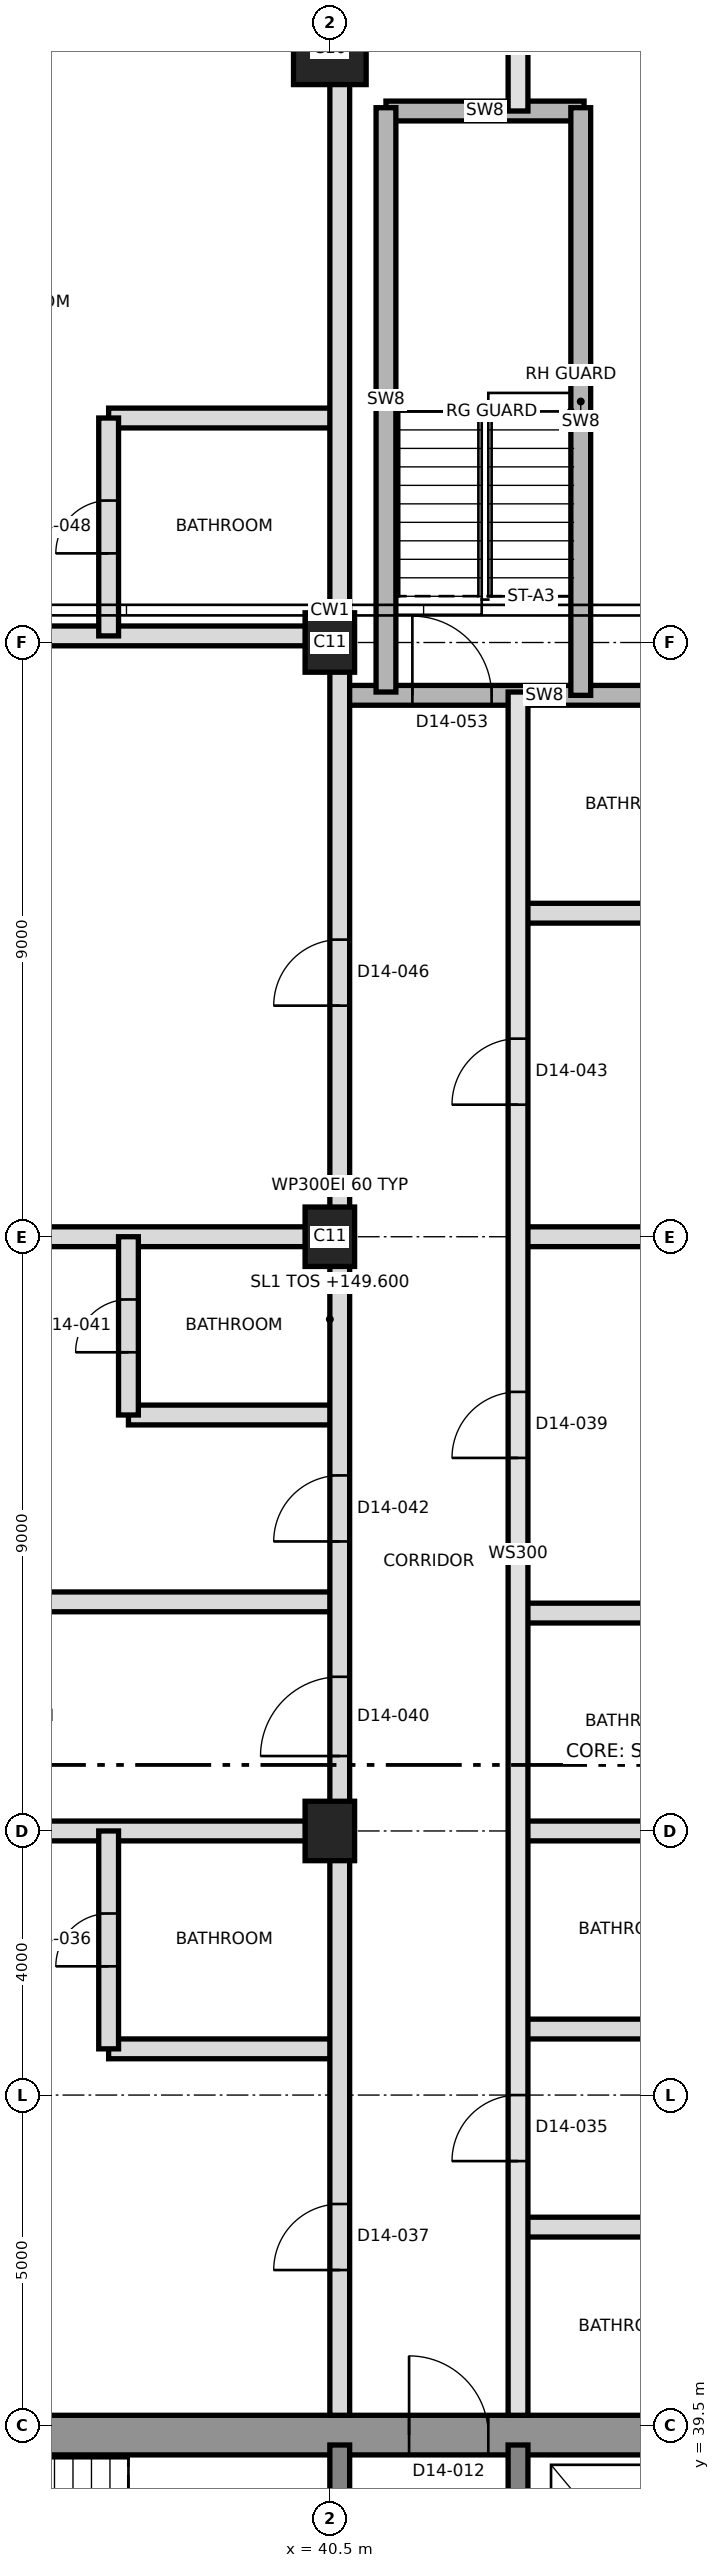
"""IFC4 building model, lengths in metres.
Left out: names, types, materials, properties, quantities, classifications, styles, units other than length and angle.
Written with IfcOpenShell. Run it as: python <this file> out.ifc"""

import sys

from ifc_helpers import new_model, si_unit, direction, frame, frame_2d, origin, origin_2d, place, context, subcontext, project, spatial, rectangle, extrude, element, fill, save


model = new_model("IFC4")
c1 = context("Model", 3, precision=1e-05, world=origin(), true_north=direction((0.0, 1.0)))
c2 = subcontext(c1, "Body", "Model", "MODEL_VIEW")
j1 = project(units=[si_unit("LENGTHUNIT", "METRE"), si_unit("PLANEANGLEUNIT", "RADIAN")], contexts=[c1])
p1 = place(None, origin())
s1 = spatial("IfcSite", under=j1, at=p1, CompositionType="ELEMENT")
p2 = place(p1, origin())
s2 = spatial("IfcBuilding", under=s1, at=p2, CompositionType="ELEMENT")
p3 = place(p2, frame((0.0, 0.0, 149.6)))
s3 = spatial("IfcBuildingStorey", under=s2, at=p3, CompositionType="ELEMENT", Elevation=149.6)
p4 = place(p3, frame((31.2, 39.35, 0.0), z_axis=(0.0, 0.0, 1.0), x_axis=(1.0, 0.0, 0.0)))
e1 = element("IfcWall", 1, at=p4, inside=s3, PredefinedType="SHEAR", context=c2, shape_type="SweptSolid", body=[
    extrude(rectangle(XDim=27.0, YDim=0.6, at=frame_2d((13.5, 0.0))), origin(), (0.0, 0.0, 1.0), 3.7),
])
p5 = place(p4, frame((10.5, 0.0, 0.0)))
e2 = element("IfcOpeningElement", 2, at=p5, cuts=e1, PredefinedType="OPENING", context=c2, shape_type="SweptSolid", body=[
    extrude(rectangle(XDim=1.2, YDim=2.1, at=frame_2d((0.6, 1.05))), frame((0.0, 0.31, 0.0), z_axis=(0.0, -1.0, 0.0), x_axis=(1.0, 0.0, 0.0)), (0.0, 0.0, 1.0), 0.62),
])
for number, where, z_axis, x_axis in (
    (3, (40.65, 33.5, 0.0), (0.0, 0.0, 1.0), (0.0, 1.0, 0.0)),
    (4, (43.35, 33.5, 0.0), (0.0, 0.0, 1.0), (0.0, 1.0, 0.0)),
):
    element("IfcWall", number, at=place(p3, frame(where, z_axis=z_axis, x_axis=x_axis)), inside=s3, PredefinedType="SHEAR", context=c2, shape_type="SweptSolid", body=[
        extrude(rectangle(XDim=5.7, YDim=0.3, at=frame_2d((2.85, 0.0))), origin(), (0.0, 0.0, 1.0), 3.7),
    ])
for number, where, z_axis, x_axis in (
    (5, (40.5, 48.5, 0.0), (0.0, 0.0, 1.0), (0.0, 1.0, 0.0)),
    (6, (40.5, 57.5, 0.0), (0.0, 0.0, 1.0), (0.0, 1.0, 0.0)),
    (7, (40.5, 66.5, 0.0), (0.0, 0.0, 1.0), (0.0, 1.0, 0.0)),
):
    element("IfcColumn", number, at=place(p3, frame(where, z_axis=z_axis, x_axis=x_axis)), inside=s3, PredefinedType="COLUMN", context=c2, shape_type="SweptSolid", body=[
        extrude(rectangle(XDim=0.9, YDim=0.75, at=origin_2d()), origin(), (0.0, 0.0, 1.0), 3.7),
    ])
p6 = place(p3, frame((40.5, 75.5, 0.0), z_axis=(0.0, 0.0, 1.0), x_axis=(1.0, 0.0, 0.0)))
e8 = element("IfcColumn", 8, at=p6, inside=s3, PredefinedType="COLUMN", context=c2, shape_type="SweptSolid", body=[
    extrude(rectangle(XDim=1.1, YDim=1.1, at=origin_2d()), origin(), (0.0, 0.0, 1.0), 3.7),
])
p7 = place(p3, frame((43.35, 42.5, 0.0), z_axis=(0.0, 0.0, 1.0), x_axis=(1.0, 0.0, 0.0)))
e9 = element("IfcWall", 9, at=p7, inside=s3, PredefinedType="PARTITIONING", context=c2, shape_type="SweptSolid", body=[
    extrude(rectangle(XDim=3.3, YDim=0.3, at=frame_2d((1.65, 0.0))), origin(), (0.0, 0.0, 1.0), 3.4),
])
p8 = place(p3, frame((37.15, 45.2, 0.0), z_axis=(0.0, 0.0, 1.0), x_axis=(1.0, 0.0, 0.0)))
e10 = element("IfcWall", 10, at=p8, inside=s3, PredefinedType="PARTITIONING", context=c2, shape_type="SweptSolid", body=[
    extrude(rectangle(XDim=3.5, YDim=0.3, at=frame_2d((1.75, 0.0))), origin(), (0.0, 0.0, 1.0), 3.4),
])
p9 = place(p3, frame((43.35, 45.5, 0.0), z_axis=(0.0, 0.0, 1.0), x_axis=(1.0, 0.0, 0.0)))
e11 = element("IfcWall", 11, at=p9, inside=s3, PredefinedType="PARTITIONING", context=c2, shape_type="SweptSolid", body=[
    extrude(rectangle(XDim=3.3, YDim=0.3, at=frame_2d((1.65, 0.0))), origin(), (0.0, 0.0, 1.0), 3.4),
])
p10 = place(p3, frame((30.35, 48.5, 0.0), z_axis=(0.0, 0.0, 1.0), x_axis=(1.0, 0.0, 0.0)))
e12 = element("IfcWall", 12, at=p10, inside=s3, PredefinedType="PARTITIONING", context=c2, shape_type="SweptSolid", body=[
    extrude(rectangle(XDim=10.3, YDim=0.3, at=frame_2d((5.15, 0.0))), origin(), (0.0, 0.0, 1.0), 3.35),
])
p11 = place(p3, frame((43.35, 48.5, 0.0), z_axis=(0.0, 0.0, 1.0), x_axis=(1.0, 0.0, 0.0)))
e13 = element("IfcWall", 13, at=p11, inside=s3, PredefinedType="PARTITIONING", context=c2, shape_type="SweptSolid", body=[
    extrude(rectangle(XDim=7.48, YDim=0.3, at=frame_2d((3.74, 0.0))), origin(), (0.0, 0.0, 1.0), 3.35),
])
p12 = place(p3, frame((43.35, 51.8, 0.0), z_axis=(0.0, 0.0, 1.0), x_axis=(1.0, 0.0, 0.0)))
e14 = element("IfcWall", 14, at=p12, inside=s3, PredefinedType="PARTITIONING", context=c2, shape_type="SweptSolid", body=[
    extrude(rectangle(XDim=3.5, YDim=0.3, at=frame_2d((1.75, 0.0))), origin(), (0.0, 0.0, 1.0), 3.4),
])
p13 = place(p3, frame((30.35, 51.97, 0.0), z_axis=(0.0, 0.0, 1.0), x_axis=(1.0, 0.0, 0.0)))
e15 = element("IfcWall", 15, at=p13, inside=s3, PredefinedType="PARTITIONING", context=c2, shape_type="SweptSolid", body=[
    extrude(rectangle(XDim=10.3, YDim=0.3, at=frame_2d((5.15, 0.0))), origin(), (0.0, 0.0, 1.0), 3.35),
])
p14 = place(p3, frame((37.45, 54.8, 0.0), z_axis=(0.0, 0.0, 1.0), x_axis=(1.0, 0.0, 0.0)))
e16 = element("IfcWall", 16, at=p14, inside=s3, PredefinedType="PARTITIONING", context=c2, shape_type="SweptSolid", body=[
    extrude(rectangle(XDim=3.2, YDim=0.3, at=frame_2d((1.6, 0.0))), origin(), (0.0, 0.0, 1.0), 3.4),
])
p15 = place(p3, frame((30.35, 57.5, 0.0), z_axis=(0.0, 0.0, 1.0), x_axis=(1.0, 0.0, 0.0)))
e17 = element("IfcWall", 17, at=p15, inside=s3, PredefinedType="PARTITIONING", context=c2, shape_type="SweptSolid", body=[
    extrude(rectangle(XDim=10.3, YDim=0.3, at=frame_2d((5.15, 0.0))), origin(), (0.0, 0.0, 1.0), 3.35),
])
p16 = place(p3, frame((43.35, 57.5, 0.0), z_axis=(0.0, 0.0, 1.0), x_axis=(1.0, 0.0, 0.0)))
e18 = element("IfcWall", 18, at=p16, inside=s3, PredefinedType="PARTITIONING", context=c2, shape_type="SweptSolid", body=[
    extrude(rectangle(XDim=7.48, YDim=0.3, at=frame_2d((3.74, 0.0))), origin(), (0.0, 0.0, 1.0), 3.35),
])
p17 = place(p3, frame((43.35, 62.4, 0.0), z_axis=(0.0, 0.0, 1.0), x_axis=(1.0, 0.0, 0.0)))
e19 = element("IfcWall", 19, at=p17, inside=s3, PredefinedType="PARTITIONING", context=c2, shape_type="SweptSolid", body=[
    extrude(rectangle(XDim=7.48, YDim=0.3, at=frame_2d((3.74, 0.0))), origin(), (0.0, 0.0, 1.0), 3.35),
])
p18 = place(p17, frame((4.65, 0.0, 0.0)))
e20 = element("IfcOpeningElement", 20, at=p18, cuts=e19, PredefinedType="OPENING", context=c2, shape_type="SweptSolid", body=[
    extrude(rectangle(XDim=1.0, YDim=2.1, at=frame_2d((0.5, 1.05))), frame((0.0, 0.16, 0.0), z_axis=(0.0, -1.0, 0.0), x_axis=(1.0, 0.0, 0.0)), (0.0, 0.0, 1.0), 0.32),
])
p19 = place(p3, frame((40.65, 65.7, 0.0), z_axis=(0.0, 0.0, 1.0), x_axis=(1.0, 0.0, 0.0)))
e21 = element("IfcWall", 21, at=p19, inside=s3, PredefinedType="SHEAR", context=c2, shape_type="SweptSolid", body=[
    extrude(rectangle(XDim=6.2, YDim=0.3, at=frame_2d((3.1, 0.0))), origin(), (0.0, 0.0, 1.0), 3.4),
])
p20 = place(p19, frame((1.1, 0.0, 0.0)))
e22 = element("IfcOpeningElement", 22, at=p20, cuts=e21, PredefinedType="OPENING", context=c2, shape_type="SweptSolid", body=[
    extrude(rectangle(XDim=1.2, YDim=2.1, at=frame_2d((0.6, 1.05))), frame((0.0, 0.16, 0.0), z_axis=(0.0, -1.0, 0.0), x_axis=(1.0, 0.0, 0.0)), (0.0, 0.0, 1.0), 0.32),
])
p21 = place(p3, frame((30.35, 66.6, 0.0), z_axis=(0.0, 0.0, 1.0), x_axis=(1.0, 0.0, 0.0)))
e23 = element("IfcWall", 23, at=p21, inside=s3, PredefinedType="PARTITIONING", context=c2, shape_type="SweptSolid", body=[
    extrude(rectangle(XDim=10.3, YDim=0.3, at=frame_2d((5.15, 0.0))), origin(), (0.0, 0.0, 1.0), 3.35),
])
p22 = place(p21, frame((4.65, 0.0, 0.0)))
e24 = element("IfcOpeningElement", 24, at=p22, cuts=e23, PredefinedType="OPENING", context=c2, shape_type="SweptSolid", body=[
    extrude(rectangle(XDim=1.0, YDim=2.1, at=frame_2d((0.5, 1.05))), frame((0.0, 0.16, 0.0), z_axis=(0.0, -1.0, 0.0), x_axis=(1.0, 0.0, 0.0)), (0.0, 0.0, 1.0), 0.32),
])
p23 = place(p3, frame((37.15, 69.9, 0.0), z_axis=(0.0, 0.0, 1.0), x_axis=(1.0, 0.0, 0.0)))
e25 = element("IfcWall", 25, at=p23, inside=s3, PredefinedType="PARTITIONING", context=c2, shape_type="SweptSolid", body=[
    extrude(rectangle(XDim=3.5, YDim=0.3, at=frame_2d((1.75, 0.0))), origin(), (0.0, 0.0, 1.0), 3.4),
])
p24 = place(p3, frame((41.35, 74.55, 0.0), z_axis=(0.0, 0.0, 1.0), x_axis=(1.0, 0.0, 0.0)))
e26 = element("IfcWall", 26, at=p24, inside=s3, PredefinedType="SHEAR", context=c2, shape_type="SweptSolid", body=[
    extrude(rectangle(XDim=3.0, YDim=0.3, at=frame_2d((1.5, 0.0))), origin(), (0.0, 0.0, 1.0), 3.4),
])
p25 = place(p3, frame((37.15, 45.2, 0.0), z_axis=(0.0, 0.0, 1.0), x_axis=(0.0, 1.0, 0.0)))
e27 = element("IfcWall", 27, at=p25, inside=s3, PredefinedType="PARTITIONING", context=c2, shape_type="SweptSolid", body=[
    extrude(rectangle(XDim=3.3, YDim=0.3, at=frame_2d((1.65, 0.0))), origin(), (0.0, 0.0, 1.0), 3.4),
])
p26 = place(p25, frame((1.25, 0.0, 0.0)))
e28 = element("IfcOpeningElement", 28, at=p26, cuts=e27, PredefinedType="OPENING", context=c2, shape_type="SweptSolid", body=[
    extrude(rectangle(XDim=0.8, YDim=2.1, at=frame_2d((0.4, 1.05))), frame((0.0, 0.16, 0.0), z_axis=(0.0, -1.0, 0.0), x_axis=(1.0, 0.0, 0.0)), (0.0, 0.0, 1.0), 0.32),
])
p27 = place(p3, frame((37.15, 66.6, 0.0), z_axis=(0.0, 0.0, 1.0), x_axis=(0.0, 1.0, 0.0)))
e29 = element("IfcWall", 29, at=p27, inside=s3, PredefinedType="PARTITIONING", context=c2, shape_type="SweptSolid", body=[
    extrude(rectangle(XDim=3.3, YDim=0.3, at=frame_2d((1.65, 0.0))), origin(), (0.0, 0.0, 1.0), 3.4),
])
p28 = place(p27, frame((1.25, 0.0, 0.0)))
e30 = element("IfcOpeningElement", 30, at=p28, cuts=e29, PredefinedType="OPENING", context=c2, shape_type="SweptSolid", body=[
    extrude(rectangle(XDim=0.8, YDim=2.1, at=frame_2d((0.4, 1.05))), frame((0.0, 0.16, 0.0), z_axis=(0.0, -1.0, 0.0), x_axis=(1.0, 0.0, 0.0)), (0.0, 0.0, 1.0), 0.32),
])
p29 = place(p3, frame((37.45, 54.8, 0.0), z_axis=(0.0, 0.0, 1.0), x_axis=(0.0, 1.0, 0.0)))
e31 = element("IfcWall", 31, at=p29, inside=s3, PredefinedType="PARTITIONING", context=c2, shape_type="SweptSolid", body=[
    extrude(rectangle(XDim=2.7, YDim=0.3, at=frame_2d((1.35, 0.0))), origin(), (0.0, 0.0, 1.0), 3.4),
])
p30 = place(p29, frame((0.95, 0.0, 0.0)))
e32 = element("IfcOpeningElement", 32, at=p30, cuts=e31, PredefinedType="OPENING", context=c2, shape_type="SweptSolid", body=[
    extrude(rectangle(XDim=0.8, YDim=2.1, at=frame_2d((0.4, 1.05))), frame((0.0, 0.16, 0.0), z_axis=(0.0, -1.0, 0.0), x_axis=(1.0, 0.0, 0.0)), (0.0, 0.0, 1.0), 0.32),
])
p31 = place(p3, frame((40.65, 39.65, 0.0), z_axis=(0.0, 0.0, 1.0), x_axis=(0.0, 1.0, 0.0)))
e33 = element("IfcWall", 33, at=p31, inside=s3, PredefinedType="PARTITIONING", context=c2, shape_type="SweptSolid", body=[
    extrude(rectangle(XDim=37.24, YDim=0.3, at=frame_2d((18.62, 0.0))), origin(), (0.0, 0.0, 1.0), 3.35),
])
p32 = place(p31, frame((2.2, 0.0, 0.0)))
e34 = element("IfcOpeningElement", 34, at=p32, cuts=e33, PredefinedType="OPENING", context=c2, shape_type="SweptSolid", body=[
    extrude(rectangle(XDim=1.0, YDim=2.4, at=frame_2d((0.5, 1.2))), frame((0.0, 0.16, 0.0), z_axis=(0.0, -1.0, 0.0), x_axis=(1.0, 0.0, 0.0)), (0.0, 0.0, 1.0), 0.32),
])
p33 = place(p31, frame((9.985, 0.0, 0.0)))
e35 = element("IfcOpeningElement", 35, at=p33, cuts=e33, PredefinedType="OPENING", context=c2, shape_type="SweptSolid", body=[
    extrude(rectangle(XDim=1.2, YDim=2.1, at=frame_2d((0.6, 1.05))), frame((0.0, 0.16, 0.0), z_axis=(0.0, -1.0, 0.0), x_axis=(1.0, 0.0, 0.0)), (0.0, 0.0, 1.0), 0.32),
])
p34 = place(p31, frame((13.235, 0.0, 0.0)))
e36 = element("IfcOpeningElement", 36, at=p34, cuts=e33, PredefinedType="OPENING", context=c2, shape_type="SweptSolid", body=[
    extrude(rectangle(XDim=1.0, YDim=2.1, at=frame_2d((0.5, 1.05))), frame((0.0, 0.16, 0.0), z_axis=(0.0, -1.0, 0.0), x_axis=(1.0, 0.0, 0.0)), (0.0, 0.0, 1.0), 0.32),
])
p35 = place(p31, frame((21.35, 0.0, 0.0)))
e37 = element("IfcOpeningElement", 37, at=p35, cuts=e33, PredefinedType="OPENING", context=c2, shape_type="SweptSolid", body=[
    extrude(rectangle(XDim=1.0, YDim=2.4, at=frame_2d((0.5, 1.2))), frame((0.0, 0.16, 0.0), z_axis=(0.0, -1.0, 0.0), x_axis=(1.0, 0.0, 0.0)), (0.0, 0.0, 1.0), 0.32),
])
p36 = place(p3, frame((41.35, 65.75, 0.0), z_axis=(0.0, 0.0, 1.0), x_axis=(0.0, 1.0, 0.0)))
e38 = element("IfcWall", 38, at=p36, inside=s3, PredefinedType="SHEAR", context=c2, shape_type="SweptSolid", body=[
    extrude(rectangle(XDim=8.85, YDim=0.3, at=frame_2d((4.425, 0.0))), origin(), (0.0, 0.0, 1.0), 3.4),
])
p37 = place(p3, frame((43.35, 39.65, 0.0), z_axis=(0.0, 0.0, 1.0), x_axis=(0.0, 1.0, 0.0)))
e39 = element("IfcWall", 39, at=p37, inside=s3, PredefinedType="SOLIDWALL", context=c2, shape_type="SweptSolid", body=[
    extrude(rectangle(XDim=26.1, YDim=0.3, at=frame_2d((13.05, 0.0))), origin(), (0.0, 0.0, 1.0), 3.4),
])
p38 = place(p37, frame((3.85, 0.0, 0.0)))
e40 = element("IfcOpeningElement", 40, at=p38, cuts=e39, PredefinedType="OPENING", context=c2, shape_type="SweptSolid", body=[
    extrude(rectangle(XDim=1.0, YDim=2.4, at=frame_2d((0.5, 1.2))), frame((0.0, 0.16, 0.0), z_axis=(0.0, -1.0, 0.0), x_axis=(1.0, 0.0, 0.0)), (0.0, 0.0, 1.0), 0.32),
])
p39 = place(p37, frame((14.5, 0.0, 0.0)))
e41 = element("IfcOpeningElement", 41, at=p39, cuts=e39, PredefinedType="OPENING", context=c2, shape_type="SweptSolid", body=[
    extrude(rectangle(XDim=1.0, YDim=2.4, at=frame_2d((0.5, 1.2))), frame((0.0, 0.16, 0.0), z_axis=(0.0, -1.0, 0.0), x_axis=(1.0, 0.0, 0.0)), (0.0, 0.0, 1.0), 0.32),
])
p40 = place(p37, frame((19.85, 0.0, 0.0)))
e42 = element("IfcOpeningElement", 42, at=p40, cuts=e39, PredefinedType="OPENING", context=c2, shape_type="SweptSolid", body=[
    extrude(rectangle(XDim=1.0, YDim=2.4, at=frame_2d((0.5, 1.2))), frame((0.0, 0.16, 0.0), z_axis=(0.0, -1.0, 0.0), x_axis=(1.0, 0.0, 0.0)), (0.0, 0.0, 1.0), 0.32),
])
p41 = place(p3, frame((43.35, 74.55, 0.0), z_axis=(0.0, 0.0, 1.0), x_axis=(0.0, 1.0, 0.0)))
e43 = element("IfcWall", 43, at=p41, inside=s3, PredefinedType="SOLIDWALL", context=c2, shape_type="SweptSolid", body=[
    extrude(rectangle(XDim=2.022, YDim=0.3, at=frame_2d((1.011, 0.0))), origin(), (0.0, 0.0, 1.0), 3.35),
])
p42 = place(p3, frame((44.3, 65.7, 0.0), z_axis=(0.0, 0.0, 1.0), x_axis=(0.0, 1.0, 0.0)))
e44 = element("IfcWall", 44, at=p42, inside=s3, PredefinedType="SHEAR", context=c2, shape_type="SweptSolid", body=[
    extrude(rectangle(XDim=8.9, YDim=0.3, at=frame_2d((4.45, 0.0))), origin(), (0.0, 0.0, 1.0), 3.4),
])
p43 = place(p5, origin())
e45 = element("IfcDoor", 45, at=p43, inside=s3, OperationType="SINGLE_SWING_RIGHT", PredefinedType="DOOR", context=c2, shape_type="SweptSolid", body=[
    extrude(rectangle(XDim=1.2, YDim=2.1, at=frame_2d((0.6, 1.05))), frame((0.0, 0.025, 0.0), z_axis=(0.0, -1.0, 0.0), x_axis=(1.0, 0.0, 0.0)), (0.0, 0.0, 1.0), 0.05),
])
fill(e2, e45)
p44 = place(p38, origin())
e46 = element("IfcDoor", 46, at=p44, inside=s3, OperationType="SINGLE_SWING_LEFT", PredefinedType="DOOR", context=c2, shape_type="SweptSolid", body=[
    extrude(rectangle(XDim=1.0, YDim=2.4, at=frame_2d((0.5, 1.2))), frame((0.0, 0.025, 0.0), z_axis=(0.0, -1.0, 0.0), x_axis=(1.0, 0.0, 0.0)), (0.0, 0.0, 1.0), 0.05),
])
fill(e40, e46)
p45 = place(p26, origin())
e47 = element("IfcDoor", 47, at=p45, inside=s3, OperationType="SINGLE_SWING_RIGHT", PredefinedType="DOOR", context=c2, shape_type="SweptSolid", body=[
    extrude(rectangle(XDim=0.8, YDim=2.1, at=frame_2d((0.4, 1.05))), frame((0.0, 0.025, 0.0), z_axis=(0.0, -1.0, 0.0), x_axis=(1.0, 0.0, 0.0)), (0.0, 0.0, 1.0), 0.05),
])
fill(e28, e47)
p46 = place(p32, origin())
e48 = element("IfcDoor", 48, at=p46, inside=s3, OperationType="SINGLE_SWING_LEFT", PredefinedType="DOOR", context=c2, shape_type="SweptSolid", body=[
    extrude(rectangle(XDim=1.0, YDim=2.4, at=frame_2d((0.5, 1.2))), frame((0.0, 0.025, 0.0), z_axis=(0.0, -1.0, 0.0), x_axis=(1.0, 0.0, 0.0)), (0.0, 0.0, 1.0), 0.05),
])
fill(e34, e48)
p47 = place(p39, origin())
e49 = element("IfcDoor", 49, at=p47, inside=s3, OperationType="SINGLE_SWING_LEFT", PredefinedType="DOOR", context=c2, shape_type="SweptSolid", body=[
    extrude(rectangle(XDim=1.0, YDim=2.4, at=frame_2d((0.5, 1.2))), frame((0.0, 0.025, 0.0), z_axis=(0.0, -1.0, 0.0), x_axis=(1.0, 0.0, 0.0)), (0.0, 0.0, 1.0), 0.05),
])
fill(e41, e49)
p48 = place(p33, origin())
e50 = element("IfcDoor", 50, at=p48, inside=s3, OperationType="SINGLE_SWING_RIGHT", PredefinedType="DOOR", context=c2, shape_type="SweptSolid", body=[
    extrude(rectangle(XDim=1.2, YDim=2.1, at=frame_2d((0.6, 1.05))), frame((0.0, 0.025, 0.0), z_axis=(0.0, -1.0, 0.0), x_axis=(1.0, 0.0, 0.0)), (0.0, 0.0, 1.0), 0.05),
])
fill(e35, e50)
p49 = place(p30, origin())
e51 = element("IfcDoor", 51, at=p49, inside=s3, OperationType="SINGLE_SWING_LEFT", PredefinedType="DOOR", context=c2, shape_type="SweptSolid", body=[
    extrude(rectangle(XDim=0.8, YDim=2.1, at=frame_2d((0.4, 1.05))), frame((0.0, 0.025, 0.0), z_axis=(0.0, -1.0, 0.0), x_axis=(1.0, 0.0, 0.0)), (0.0, 0.0, 1.0), 0.05),
])
fill(e32, e51)
p50 = place(p34, origin())
e52 = element("IfcDoor", 52, at=p50, inside=s3, OperationType="SINGLE_SWING_LEFT", PredefinedType="DOOR", context=c2, shape_type="SweptSolid", body=[
    extrude(rectangle(XDim=1.0, YDim=2.1, at=frame_2d((0.5, 1.05))), frame((0.0, 0.025, 0.0), z_axis=(0.0, -1.0, 0.0), x_axis=(1.0, 0.0, 0.0)), (0.0, 0.0, 1.0), 0.05),
])
fill(e36, e52)
p51 = place(p40, origin())
e53 = element("IfcDoor", 53, at=p51, inside=s3, OperationType="SINGLE_SWING_RIGHT", PredefinedType="DOOR", context=c2, shape_type="SweptSolid", body=[
    extrude(rectangle(XDim=1.0, YDim=2.4, at=frame_2d((0.5, 1.2))), frame((0.0, 0.025, 0.0), z_axis=(0.0, -1.0, 0.0), x_axis=(1.0, 0.0, 0.0)), (0.0, 0.0, 1.0), 0.05),
])
fill(e42, e53)
p52 = place(p35, origin())
e54 = element("IfcDoor", 54, at=p52, inside=s3, OperationType="SINGLE_SWING_RIGHT", PredefinedType="DOOR", context=c2, shape_type="SweptSolid", body=[
    extrude(rectangle(XDim=1.0, YDim=2.4, at=frame_2d((0.5, 1.2))), frame((0.0, 0.025, 0.0), z_axis=(0.0, -1.0, 0.0), x_axis=(1.0, 0.0, 0.0)), (0.0, 0.0, 1.0), 0.05),
])
fill(e37, e54)
p53 = place(p28, origin())
e55 = element("IfcDoor", 55, at=p53, inside=s3, OperationType="SINGLE_SWING_LEFT", PredefinedType="DOOR", context=c2, shape_type="SweptSolid", body=[
    extrude(rectangle(XDim=0.8, YDim=2.1, at=frame_2d((0.4, 1.05))), frame((0.0, 0.025, 0.0), z_axis=(0.0, -1.0, 0.0), x_axis=(1.0, 0.0, 0.0)), (0.0, 0.0, 1.0), 0.05),
])
fill(e30, e55)
p54 = place(p20, origin())
e56 = element("IfcDoor", 56, at=p54, inside=s3, OperationType="SINGLE_SWING_RIGHT", PredefinedType="DOOR", context=c2, shape_type="SweptSolid", body=[
    extrude(rectangle(XDim=1.2, YDim=2.1, at=frame_2d((0.6, 1.05))), frame((0.0, 0.025, 0.0), z_axis=(0.0, -1.0, 0.0), x_axis=(1.0, 0.0, 0.0)), (0.0, 0.0, 1.0), 0.05),
])
fill(e22, e56)
save(model, sys.argv[1])
